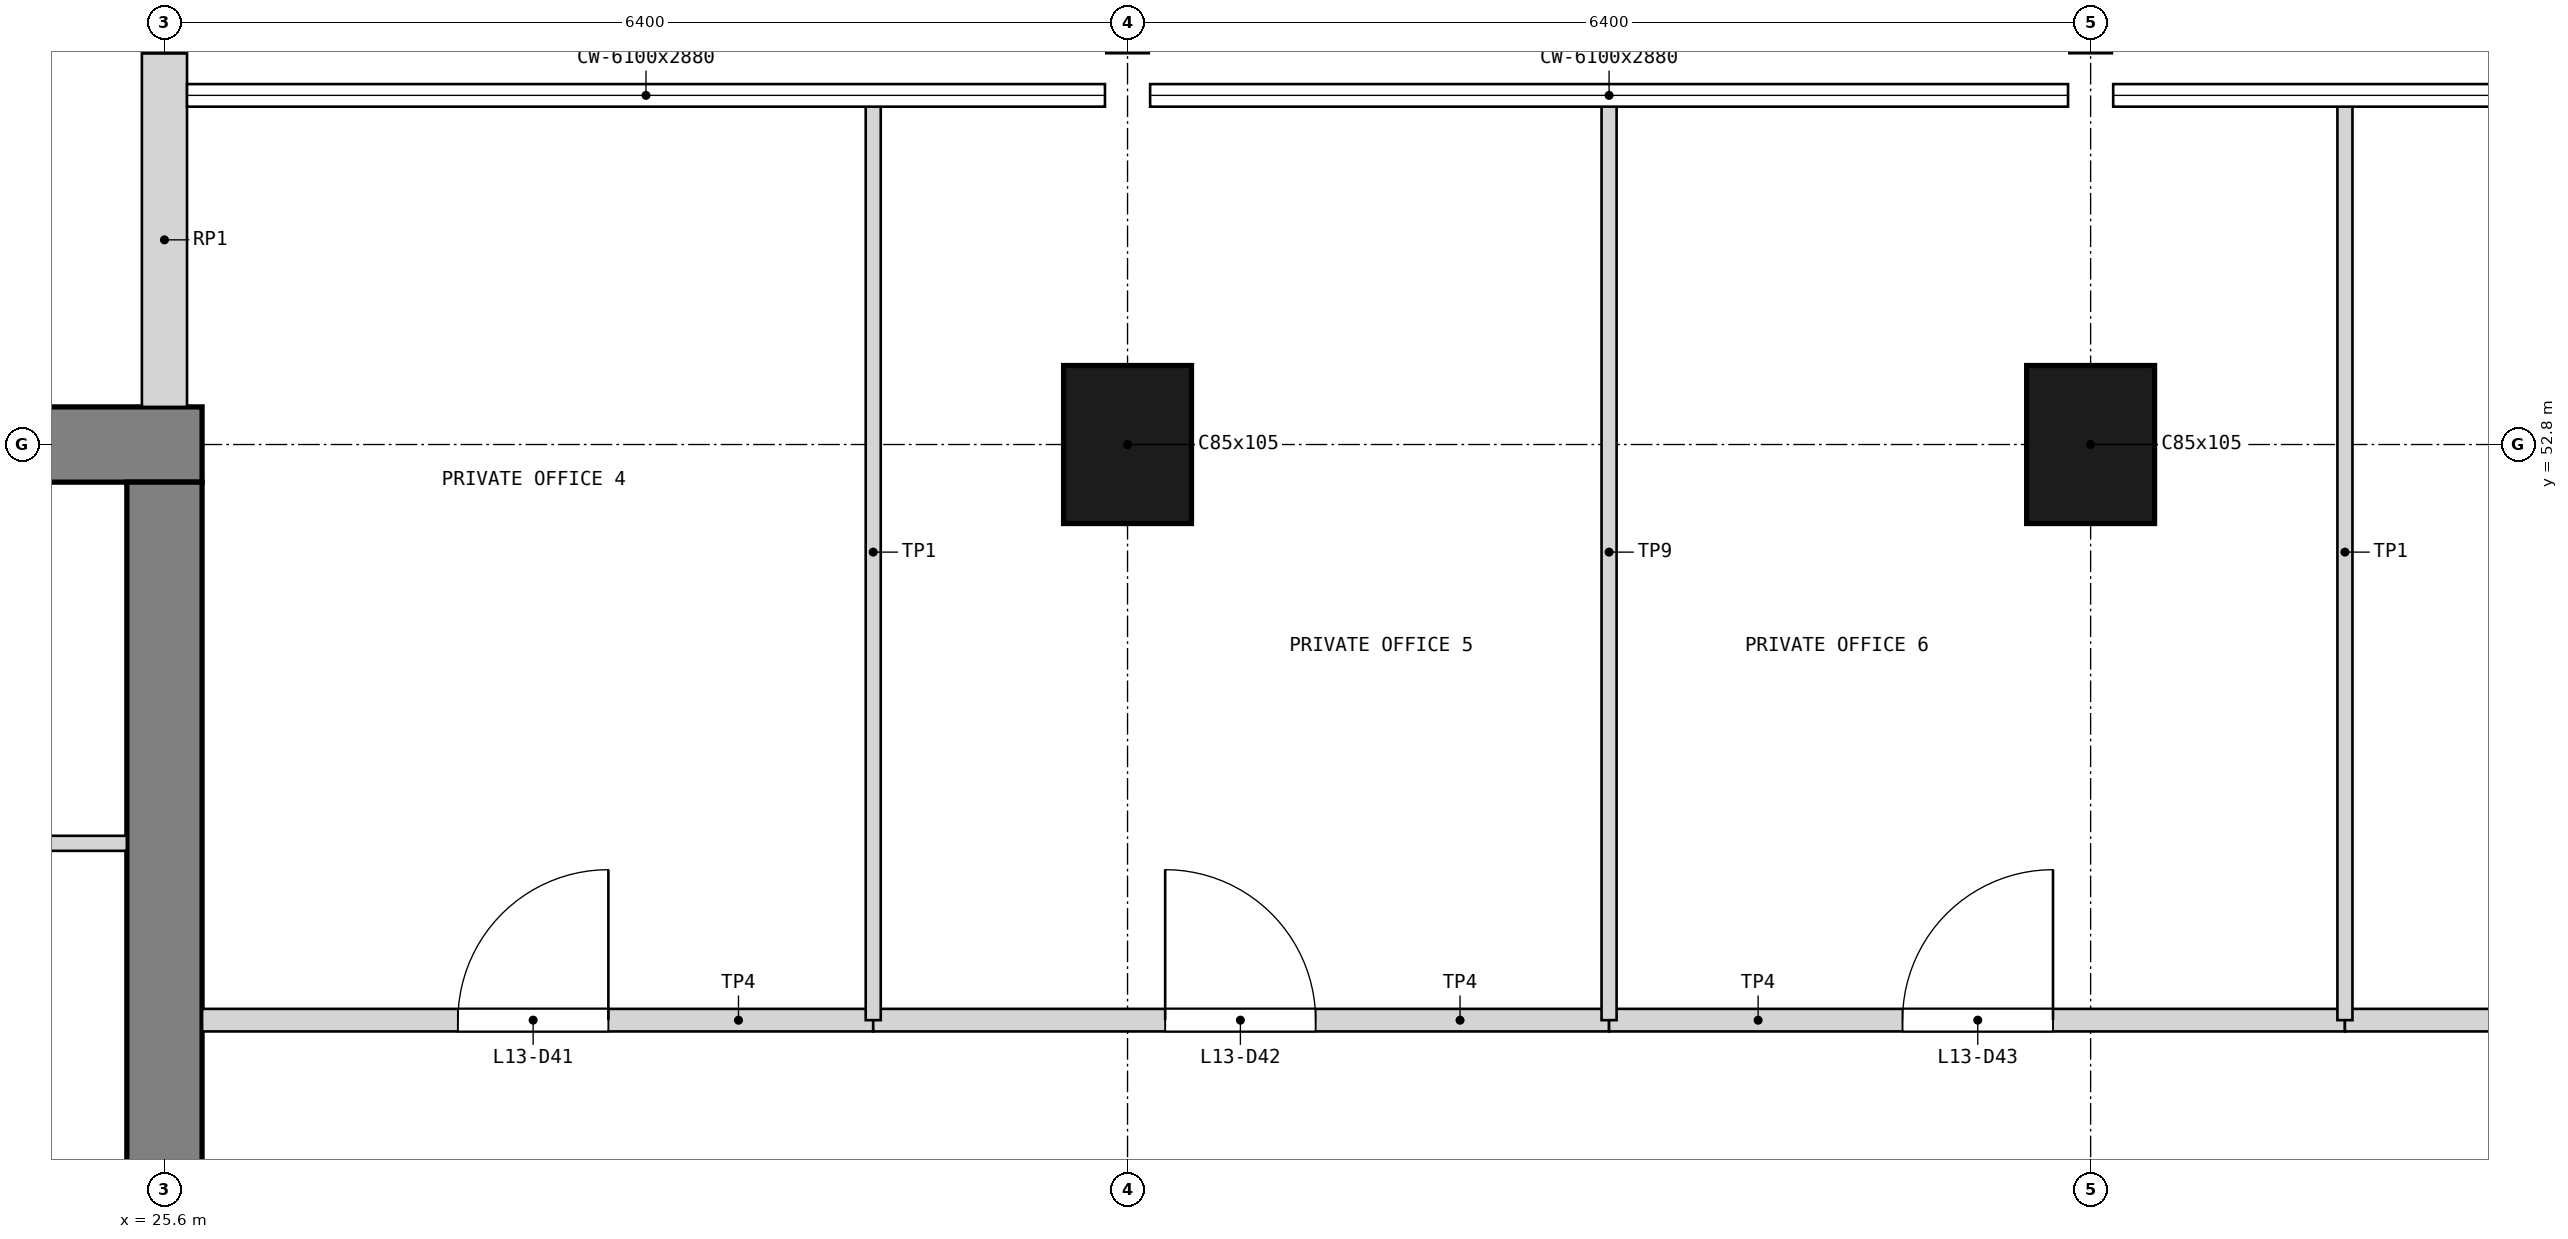
"""IFC4 building model, lengths in metres.
Left out: names, types, materials, properties, quantities, classifications, styles, units other than length and angle.
Written with IfcOpenShell. Run it as: python <this file> out.ifc"""

import sys

from ifc_helpers import new_model, si_unit, direction, frame, frame_2d, origin, origin_2d, place, context, subcontext, project, spatial, rectangle, extrude, element, fill, save


model = new_model("IFC4")
c1 = context("Model", 3, precision=1e-05, world=origin(), true_north=direction((0.0, 1.0)))
c2 = subcontext(c1, "Body", "Model", "MODEL_VIEW")
j1 = project(units=[si_unit("LENGTHUNIT", "METRE"), si_unit("PLANEANGLEUNIT", "RADIAN")], contexts=[c1])
p1 = place(None, origin())
s1 = spatial("IfcSite", under=j1, at=p1, CompositionType="ELEMENT")
p2 = place(p1, origin())
s2 = spatial("IfcBuilding", under=s1, at=p2, CompositionType="ELEMENT")
p3 = place(p2, frame((0.0, 0.0, 52.2)))
s3 = spatial("IfcBuildingStorey", under=s2, at=p3, CompositionType="ELEMENT", Elevation=52.2)
p4 = place(p3, frame((12.55, 52.8, 0.0), z_axis=(0.0, 0.0, 1.0), x_axis=(1.0, 0.0, 0.0)))
e1 = element("IfcWall", 1, at=p4, inside=s3, PredefinedType="SHEAR", context=c2, shape_type="SweptSolid", body=[
    extrude(rectangle(XDim=13.3, YDim=0.5, at=frame_2d((6.65, 0.0))), origin(), (0.0, 0.0, 1.0), 3.9),
])
p5 = place(p4, frame((1.85, 0.0, 1.0)))
e2 = element("IfcOpeningElement", 2, at=p5, cuts=e1, PredefinedType="OPENING", context=c2, shape_type="SweptSolid", body=[
    extrude(rectangle(XDim=0.4, YDim=2.0, at=frame_2d((0.2, 1.0))), frame((0.0, 0.26, 0.0), z_axis=(0.0, -1.0, 0.0), x_axis=(1.0, 0.0, 0.0)), (0.0, 0.0, 1.0), 0.52),
])
p6 = place(p3, frame((25.6, 33.85, 0.0), z_axis=(0.0, 0.0, 1.0), x_axis=(0.0, 1.0, 0.0)))
e3 = element("IfcWall", 3, at=p6, inside=s3, PredefinedType="SHEAR", context=c2, shape_type="SweptSolid", body=[
    extrude(rectangle(XDim=18.7, YDim=0.5, at=frame_2d((9.35, 0.0))), origin(), (0.0, 0.0, 1.0), 3.9),
])
p7 = place(p6, frame((8.35, 0.0, 0.0)))
e4 = element("IfcOpeningElement", 4, at=p7, cuts=e3, PredefinedType="OPENING", context=c2, shape_type="SweptSolid", body=[
    extrude(rectangle(XDim=2.0, YDim=2.1, at=frame_2d((1.0, 1.05))), frame((0.0, 0.26, 0.0), z_axis=(0.0, -1.0, 0.0), x_axis=(1.0, 0.0, 0.0)), (0.0, 0.0, 1.0), 0.52),
])
for number, where, z_axis, x_axis in (
    (5, (32.0, 52.8, 0.0), (0.0, 0.0, 1.0), (1.0, 0.0, 0.0)),
    (6, (38.4, 52.8, 0.0), (0.0, 0.0, 1.0), (1.0, 0.0, 0.0)),
):
    element("IfcColumn", number, at=place(p3, frame(where, z_axis=z_axis, x_axis=x_axis)), inside=s3, PredefinedType="COLUMN", context=c2, shape_type="SweptSolid", body=[
        extrude(rectangle(XDim=0.85, YDim=1.05, at=origin_2d()), origin(), (0.0, 0.0, 1.0), 3.9),
    ])
p8 = place(p3, frame((25.6, 53.05, 0.0), z_axis=(0.0, 0.0, 1.0), x_axis=(0.0, 1.0, 0.0)))
e7 = element("IfcWall", 7, at=p8, inside=s3, PredefinedType="SOLIDWALL", context=c2, shape_type="SweptSolid", body=[
    extrude(rectangle(XDim=2.35, YDim=0.3, at=frame_2d((1.175, 0.0))), origin(), (0.0, 0.0, 1.0), 2.88),
])
p9 = place(p3, frame((20.125, 50.15, 0.0), z_axis=(0.0, 0.0, 1.0), x_axis=(1.0, 0.0, 0.0)))
e8 = element("IfcWall", 8, at=p9, inside=s3, PredefinedType="PARTITIONING", context=c2, shape_type="SweptSolid", body=[
    extrude(rectangle(XDim=5.225, YDim=0.1, at=frame_2d((2.613, 0.0))), origin(), (0.0, 0.0, 1.0), 3.6),
])
p10 = place(p3, frame((25.85, 48.975, 0.0), z_axis=(0.0, 0.0, 1.0), x_axis=(1.0, 0.0, 0.0)))
e9 = element("IfcWall", 9, at=p10, inside=s3, PredefinedType="PARTITIONING", context=c2, shape_type="SweptSolid", body=[
    extrude(rectangle(XDim=4.46, YDim=0.15, at=frame_2d((2.23, 0.0))), origin(), (0.0, 0.0, 1.0), 3.68),
])
p11 = place(p10, frame((1.7, 0.0, 0.0)))
e10 = element("IfcOpeningElement", 10, at=p11, cuts=e9, PredefinedType="OPENING", context=c2, shape_type="SweptSolid", body=[
    extrude(rectangle(XDim=1.0, YDim=2.1, at=frame_2d((0.5, 1.05))), frame((0.0, 0.085, 0.0), z_axis=(0.0, -1.0, 0.0), x_axis=(1.0, 0.0, 0.0)), (0.0, 0.0, 1.0), 0.17),
])
p12 = place(p3, frame((30.31, 48.975, 0.0), z_axis=(0.0, 0.0, 1.0), x_axis=(1.0, 0.0, 0.0)))
e11 = element("IfcWall", 11, at=p12, inside=s3, PredefinedType="PARTITIONING", context=c2, shape_type="SweptSolid", body=[
    extrude(rectangle(XDim=4.89, YDim=0.15, at=frame_2d((2.445, 0.0))), origin(), (0.0, 0.0, 1.0), 3.68),
])
p13 = place(p12, frame((1.94, 0.0, 0.0)))
e12 = element("IfcOpeningElement", 12, at=p13, cuts=e11, PredefinedType="OPENING", context=c2, shape_type="SweptSolid", body=[
    extrude(rectangle(XDim=1.0, YDim=2.1, at=frame_2d((0.5, 1.05))), frame((0.0, 0.085, 0.0), z_axis=(0.0, -1.0, 0.0), x_axis=(1.0, 0.0, 0.0)), (0.0, 0.0, 1.0), 0.17),
])
p14 = place(p3, frame((35.2, 48.975, 0.0), z_axis=(0.0, 0.0, 1.0), x_axis=(1.0, 0.0, 0.0)))
e13 = element("IfcWall", 13, at=p14, inside=s3, PredefinedType="PARTITIONING", context=c2, shape_type="SweptSolid", body=[
    extrude(rectangle(XDim=4.89, YDim=0.15, at=frame_2d((2.445, 0.0))), origin(), (0.0, 0.0, 1.0), 3.68),
])
p15 = place(p14, frame((1.95, 0.0, 0.0)))
e14 = element("IfcOpeningElement", 14, at=p15, cuts=e13, PredefinedType="OPENING", context=c2, shape_type="SweptSolid", body=[
    extrude(rectangle(XDim=1.0, YDim=2.1, at=frame_2d((0.5, 1.05))), frame((0.0, 0.085, 0.0), z_axis=(0.0, -1.0, 0.0), x_axis=(1.0, 0.0, 0.0)), (0.0, 0.0, 1.0), 0.17),
])
p16 = place(p3, frame((40.09, 48.975, 0.0), z_axis=(0.0, 0.0, 1.0), x_axis=(1.0, 0.0, 0.0)))
e15 = element("IfcWall", 15, at=p16, inside=s3, PredefinedType="PARTITIONING", context=c2, shape_type="SweptSolid", body=[
    extrude(rectangle(XDim=4.53, YDim=0.15, at=frame_2d((2.265, 0.0))), origin(), (0.0, 0.0, 1.0), 3.68),
])
p17 = place(p16, frame((1.76, 0.0, 0.0)))
e16 = element("IfcOpeningElement", 16, at=p17, cuts=e15, PredefinedType="OPENING", context=c2, shape_type="SweptSolid", body=[
    extrude(rectangle(XDim=1.0, YDim=2.1, at=frame_2d((0.5, 1.05))), frame((0.0, 0.085, 0.0), z_axis=(0.0, -1.0, 0.0), x_axis=(1.0, 0.0, 0.0)), (0.0, 0.0, 1.0), 0.17),
])
p18 = place(p3, frame((30.31, 48.975, 0.0), z_axis=(0.0, 0.0, 1.0), x_axis=(0.0, 1.0, 0.0)))
e17 = element("IfcWall", 17, at=p18, inside=s3, PredefinedType="PARTITIONING", context=c2, shape_type="SweptSolid", body=[
    extrude(rectangle(XDim=6.125, YDim=0.1, at=frame_2d((3.062, 0.0))), origin(), (0.0, 0.0, 1.0), 3.68),
])
p19 = place(p3, frame((35.2, 48.975, 0.0), z_axis=(0.0, 0.0, 1.0), x_axis=(0.0, 1.0, 0.0)))
e18 = element("IfcWall", 18, at=p19, inside=s3, PredefinedType="PARTITIONING", context=c2, shape_type="SweptSolid", body=[
    extrude(rectangle(XDim=6.125, YDim=0.1, at=frame_2d((3.062, 0.0))), origin(), (0.0, 0.0, 1.0), 3.08),
])
p20 = place(p3, frame((40.09, 48.975, 0.0), z_axis=(0.0, 0.0, 1.0), x_axis=(0.0, 1.0, 0.0)))
e19 = element("IfcWall", 19, at=p20, inside=s3, PredefinedType="PARTITIONING", context=c2, shape_type="SweptSolid", body=[
    extrude(rectangle(XDim=6.125, YDim=0.1, at=frame_2d((3.062, 0.0))), origin(), (0.0, 0.0, 1.0), 3.68),
])
p21 = place(p11, origin())
e20 = element("IfcDoor", 20, at=p21, inside=s3, OperationType="SINGLE_SWING_RIGHT", PredefinedType="DOOR", context=c2, shape_type="SweptSolid", body=[
    extrude(rectangle(XDim=1.0, YDim=2.1, at=frame_2d((0.5, 1.05))), frame((0.0, 0.025, 0.0), z_axis=(0.0, -1.0, 0.0), x_axis=(1.0, 0.0, 0.0)), (0.0, 0.0, 1.0), 0.05),
])
fill(e10, e20)
p22 = place(p13, origin())
e21 = element("IfcDoor", 21, at=p22, inside=s3, OperationType="SINGLE_SWING_LEFT", PredefinedType="DOOR", context=c2, shape_type="SweptSolid", body=[
    extrude(rectangle(XDim=1.0, YDim=2.1, at=frame_2d((0.5, 1.05))), frame((0.0, 0.025, 0.0), z_axis=(0.0, -1.0, 0.0), x_axis=(1.0, 0.0, 0.0)), (0.0, 0.0, 1.0), 0.05),
])
fill(e12, e21)
p23 = place(p15, origin())
e22 = element("IfcDoor", 22, at=p23, inside=s3, OperationType="SINGLE_SWING_RIGHT", PredefinedType="DOOR", context=c2, shape_type="SweptSolid", body=[
    extrude(rectangle(XDim=1.0, YDim=2.1, at=frame_2d((0.5, 1.05))), frame((0.0, 0.025, 0.0), z_axis=(0.0, -1.0, 0.0), x_axis=(1.0, 0.0, 0.0)), (0.0, 0.0, 1.0), 0.05),
])
fill(e14, e22)
save(model, sys.argv[1])
